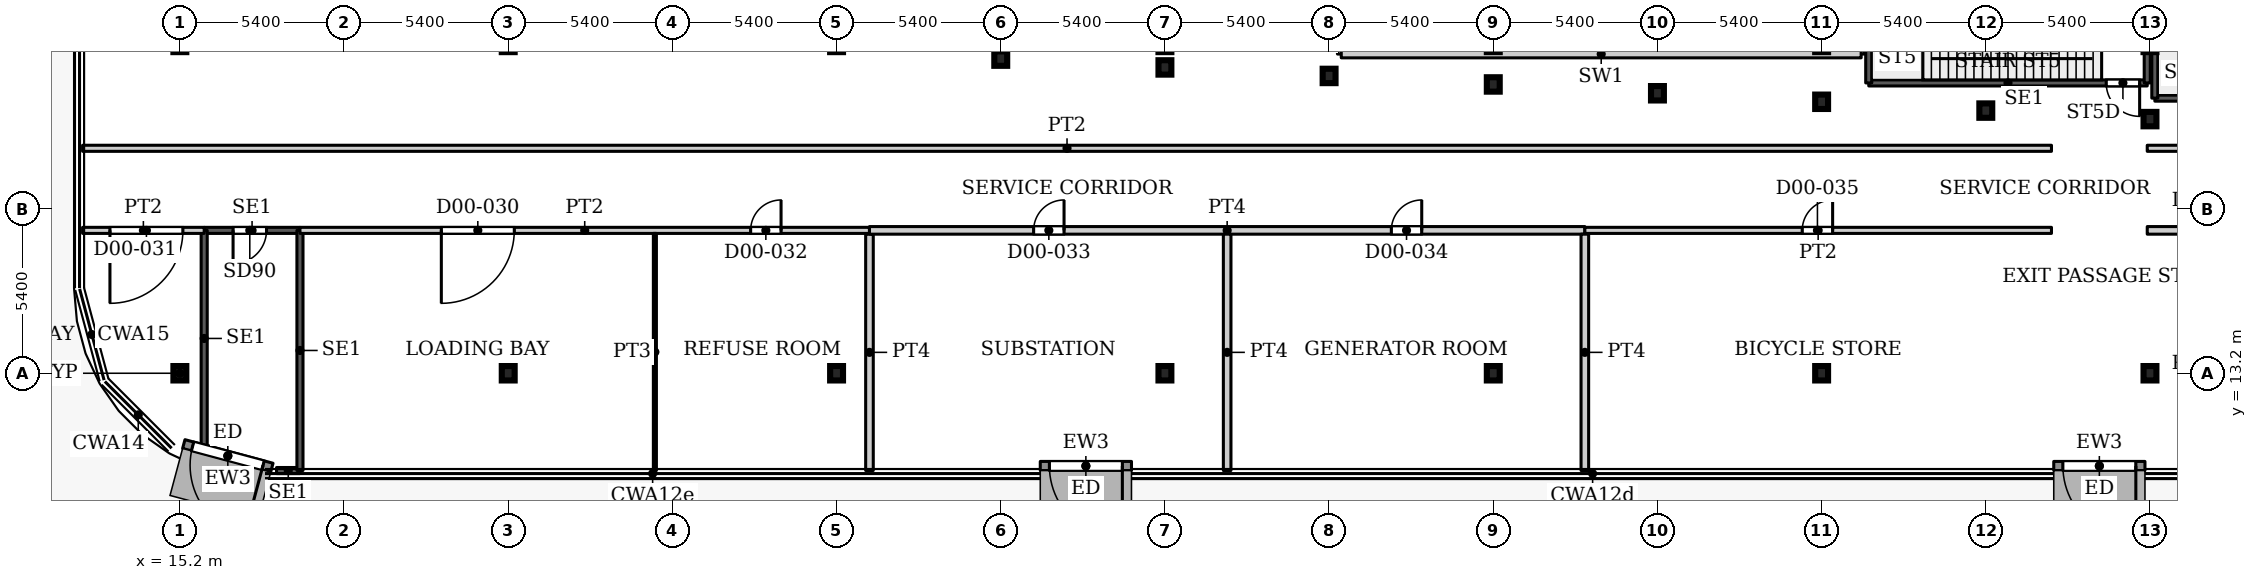
"""IFC4 building model, lengths in metres.
Left out: names, types, materials, properties, quantities, classifications, styles, units other than length and angle.
Written with IfcOpenShell. Run it as: python <this file> out.ifc"""

import sys

from ifc_helpers import new_model, si_unit, direction, frame, frame_2d, origin, origin_2d, place, context, subcontext, project, spatial, rectangle, i_section, extrude, source, transform, mapped, element, fill, save


model = new_model("IFC4")
c1 = context("Model", 3, precision=1e-05, world=origin(), true_north=direction((0.0, 1.0)))
c2 = subcontext(c1, "Body", "Model", "MODEL_VIEW")
j1 = project(units=[si_unit("LENGTHUNIT", "METRE"), si_unit("PLANEANGLEUNIT", "RADIAN")], contexts=[c1])
p1 = place(None, origin())
s1 = spatial("IfcSite", under=j1, at=p1, CompositionType="ELEMENT")
p2 = place(p1, origin())
s2 = spatial("IfcBuilding", under=s1, at=p2, CompositionType="ELEMENT")
p3 = place(p2, origin())
s3 = spatial("IfcBuildingStorey", under=s2, at=p3, CompositionType="ELEMENT", Elevation=0.0)
for number, where, z_axis, x_axis in (
    (1, (15.2, 13.2, 0.0), (0.0, 0.0, 1.0), (1.0, 0.0, 0.0)),
    (2, (26.0, 13.2, 0.0), (0.0, 0.0, 1.0), (1.0, 0.0, 0.0)),
    (3, (36.8, 13.2, 0.0), (0.0, 0.0, 1.0), (1.0, 0.0, 0.0)),
    (4, (47.6, 13.2, 0.0), (0.0, 0.0, 1.0), (1.0, 0.0, 0.0)),
    (5, (58.4, 13.2, 0.0), (0.0, 0.0, 1.0), (1.0, 0.0, 0.0)),
    (6, (69.2, 13.2, 0.0), (0.0, 0.0, 1.0), (1.0, 0.0, 0.0)),
    (7, (80.0, 13.2, 0.0), (0.0, 0.0, 1.0), (1.0, 0.0, 0.0)),
    (8, (80.0, 21.56, 0.0), (0.0, 0.0, 1.0), (1.0, 0.0, 0.0)),
    (9, (74.6, 21.84, 0.0), (0.0, 0.0, 1.0), (1.0, 0.0, 0.0)),
    (10, (69.2, 22.13, 0.0), (0.0, 0.0, 1.0), (1.0, 0.0, 0.0)),
    (11, (63.8, 22.41, 0.0), (0.0, 0.0, 1.0), (1.0, 0.0, 0.0)),
    (12, (58.4, 22.7, 0.0), (0.0, 0.0, 1.0), (1.0, 0.0, 0.0)),
    (13, (53.0, 22.98, 0.0), (0.0, 0.0, 1.0), (1.0, 0.0, 0.0)),
    (14, (47.6, 23.26, 0.0), (0.0, 0.0, 1.0), (1.0, 0.0, 0.0)),
    (15, (42.2, 23.55, 0.0), (0.0, 0.0, 1.0), (1.0, 0.0, 0.0)),
):
    element("IfcColumn", number, at=place(p3, frame(where, z_axis=z_axis, x_axis=x_axis)), inside=s3, PredefinedType="COLUMN", context=c2, shape_type="SweptSolid", body=[
        extrude(i_section(OverallWidth=0.424, OverallDepth=0.474, WebThickness=0.048, FlangeThickness=0.077, FilletRadius=0.014, at=origin_2d()), origin(), (0.0, 0.0, 1.0), 7.5),
    ])
p4 = place(p3, frame((79.835, 10.15, 0.0), z_axis=(0.0, 0.0, 1.0), x_axis=(-1.0, 0.0, 0.0)))
e16 = element("IfcWall", 16, at=p4, inside=s3, PredefinedType="SOLIDWALL", context=c2, shape_type="SweptSolid", body=[
    extrude(rectangle(XDim=3.0, YDim=0.3, at=frame_2d((1.5, 0.0))), origin(), (0.0, 0.0, 1.0), 7.25),
])
p5 = place(p4, frame((0.3, 0.0, 0.0)))
e17 = element("IfcOpeningElement", 17, at=p5, cuts=e16, PredefinedType="OPENING", context=c2, shape_type="SweptSolid", body=[
    extrude(rectangle(XDim=2.4, YDim=2.7, at=frame_2d((1.2, 1.35))), frame((0.0, 0.16, 0.0), z_axis=(0.0, -1.0, 0.0), x_axis=(1.0, 0.0, 0.0)), (0.0, 0.0, 1.0), 0.32),
])
p6 = place(p3, frame((46.5, 10.15, 0.0), z_axis=(0.0, 0.0, 1.0), x_axis=(-1.0, 0.0, 0.0)))
e18 = element("IfcWall", 18, at=p6, inside=s3, PredefinedType="SOLIDWALL", context=c2, shape_type="SweptSolid", body=[
    extrude(rectangle(XDim=3.0, YDim=0.3, at=frame_2d((1.5, 0.0))), origin(), (0.0, 0.0, 1.0), 7.25),
])
p7 = place(p6, frame((0.3, 0.0, 0.0)))
e19 = element("IfcOpeningElement", 19, at=p7, cuts=e18, PredefinedType="OPENING", context=c2, shape_type="SweptSolid", body=[
    extrude(rectangle(XDim=2.4, YDim=2.7, at=frame_2d((1.2, 1.35))), frame((0.0, 0.16, 0.0), z_axis=(0.0, -1.0, 0.0), x_axis=(1.0, 0.0, 0.0)), (0.0, 0.0, 1.0), 0.32),
])
p8 = place(p3, frame((18.226, 10.095, 0.0), z_axis=(0.0, 0.0, 1.0), x_axis=(-0.965935698168, 0.258782199939, 0.0)))
e20 = element("IfcWall", 20, at=p8, inside=s3, PredefinedType="SOLIDWALL", context=c2, shape_type="SweptSolid", body=[
    extrude(rectangle(XDim=2.999, YDim=0.3, at=frame_2d((1.5, 0.0))), origin(), (0.0, 0.0, 1.0), 7.25),
])
p9 = place(p8, frame((0.3, 0.0, 0.0)))
e21 = element("IfcOpeningElement", 21, at=p9, cuts=e20, PredefinedType="OPENING", context=c2, shape_type="SweptSolid", body=[
    extrude(rectangle(XDim=2.4, YDim=2.7, at=frame_2d((1.2, 1.35))), frame((0.0, 0.16, 0.0), z_axis=(0.0, -1.0, 0.0), x_axis=(1.0, 0.0, 0.0)), (0.0, 0.0, 1.0), 0.32),
])
p10 = place(p3, frame((80.16, 22.25, 0.0), z_axis=(0.0, 0.0, 1.0), x_axis=(1.0, 0.0, 0.0)))
e22 = element("IfcWall", 22, at=p10, inside=s3, PredefinedType="SHEAR", context=c2, shape_type="SweptSolid", body=[
    extrude(rectangle(XDim=9.16, YDim=0.2, at=frame_2d((4.58, 0.0))), origin(), (0.0, 0.0, 1.0), 7.5),
])
p11 = place(p10, frame((7.81, 0.0, 0.0)))
e23 = element("IfcOpeningElement", 23, at=p11, cuts=e22, PredefinedType="OPENING", context=c2, shape_type="SweptSolid", body=[
    extrude(rectangle(XDim=1.1, YDim=2.2, at=frame_2d((0.55, 1.1))), frame((0.0, 0.11, 0.0), z_axis=(0.0, -1.0, 0.0), x_axis=(1.0, 0.0, 0.0)), (0.0, 0.0, 1.0), 0.22),
])
p12 = place(p3, frame((80.16, 22.25, 0.0), z_axis=(0.0, 0.0, 1.0), x_axis=(0.0, 1.0, 0.0)))
e24 = element("IfcWall", 24, at=p12, inside=s3, PredefinedType="SHEAR", context=c2, shape_type="SweptSolid", body=[
    extrude(rectangle(XDim=3.15, YDim=0.2, at=frame_2d((1.575, 0.0))), origin(), (0.0, 0.0, 1.0), 7.5),
])
p13 = place(p3, frame((70.75, 22.75, 0.0), z_axis=(0.0, 0.0, 1.0), x_axis=(1.0, 0.0, 0.0)))
e25 = element("IfcWall", 25, at=p13, inside=s3, PredefinedType="SHEAR", context=c2, shape_type="SweptSolid", body=[
    extrude(rectangle(XDim=9.16, YDim=0.2, at=frame_2d((4.58, 0.0))), origin(), (0.0, 0.0, 1.0), 7.5),
])
p14 = place(p13, frame((7.81, 0.0, 0.0)))
e26 = element("IfcOpeningElement", 26, at=p14, cuts=e25, PredefinedType="OPENING", context=c2, shape_type="SweptSolid", body=[
    extrude(rectangle(XDim=1.1, YDim=2.2, at=frame_2d((0.55, 1.1))), frame((0.0, 0.11, 0.0), z_axis=(0.0, -1.0, 0.0), x_axis=(1.0, 0.0, 0.0)), (0.0, 0.0, 1.0), 0.22),
])
for number, where, z_axis, x_axis in (
    (27, (70.75, 22.75, 0.0), (0.0, 0.0, 1.0), (0.0, 1.0, 0.0)),
    (28, (79.91, 22.75, 0.0), (0.0, 0.0, 1.0), (0.0, 1.0, 0.0)),
):
    element("IfcWall", number, at=place(p3, frame(where, z_axis=z_axis, x_axis=x_axis)), inside=s3, PredefinedType="SHEAR", context=c2, shape_type="SweptSolid", body=[
        extrude(rectangle(XDim=3.15, YDim=0.2, at=frame_2d((1.575, 0.0))), origin(), (0.0, 0.0, 1.0), 7.5),
    ])
for number, where, z_axis, x_axis in (
    (29, (53.4, 23.7, 0.0), (0.0, 0.0, 1.0), (0.0, 1.0, 0.0)),
    (30, (61.95, 23.7, 0.0), (0.0, 0.0, 1.0), (0.0, 1.0, 0.0)),
    (31, (70.5, 23.7, 0.0), (0.0, 0.0, 1.0), (0.0, 1.0, 0.0)),
):
    element("IfcWall", number, at=place(p3, frame(where, z_axis=z_axis, x_axis=x_axis)), inside=s3, PredefinedType="PARTITIONING", context=c2, shape_type="SweptSolid", body=[
        extrude(rectangle(XDim=2.85, YDim=0.25, at=frame_2d((1.425, 0.0))), origin(), (0.0, 0.0, 1.0), 7.5),
    ])
p15 = place(p3, frame((53.4, 23.7, 0.0), z_axis=(0.0, 0.0, 1.0), x_axis=(1.0, 0.0, 0.0)))
e32 = element("IfcWall", 32, at=p15, inside=s3, PredefinedType="PARTITIONING", context=c2, shape_type="SweptSolid", body=[
    extrude(rectangle(XDim=17.1, YDim=0.25, at=frame_2d((8.55, 0.0))), origin(), (0.0, 0.0, 1.0), 7.5),
])
p16 = place(p3, frame((18.38, 10.0, 0.0), z_axis=(0.0, 0.0, 1.0), x_axis=(1.0, 0.0, 0.0)))
e33 = element("IfcWall", 33, at=p16, inside=s3, PredefinedType="SHEAR", context=c2, shape_type="SweptSolid", body=[
    extrude(rectangle(XDim=0.77, YDim=0.2, at=frame_2d((0.385, 0.0))), origin(), (0.0, 0.0, 1.0), 7.5),
])
p17 = place(p3, frame((16.0, 17.9, 0.0), z_axis=(0.0, 0.0, 1.0), x_axis=(1.0, 0.0, 0.0)))
e34 = element("IfcWall", 34, at=p17, inside=s3, PredefinedType="SHEAR", context=c2, shape_type="SweptSolid", body=[
    extrude(rectangle(XDim=3.15, YDim=0.2, at=frame_2d((1.575, 0.0))), origin(), (0.0, 0.0, 1.0), 7.5),
])
p18 = place(p17, frame((0.95, 0.0, 0.0)))
e35 = element("IfcOpeningElement", 35, at=p18, cuts=e34, PredefinedType="OPENING", context=c2, shape_type="SweptSolid", body=[
    extrude(rectangle(XDim=1.1, YDim=2.2, at=frame_2d((0.55, 1.1))), frame((0.0, 0.11, 0.0), z_axis=(0.0, -1.0, 0.0), x_axis=(1.0, 0.0, 0.0)), (0.0, 0.0, 1.0), 0.22),
])
p19 = place(p3, frame((16.0, 10.79, 0.0), z_axis=(0.0, 0.0, 1.0), x_axis=(0.0, 1.0, 0.0)))
e36 = element("IfcWall", 36, at=p19, inside=s3, PredefinedType="SHEAR", context=c2, shape_type="SweptSolid", body=[
    extrude(rectangle(XDim=7.11, YDim=0.2, at=frame_2d((3.555, 0.0))), origin(), (0.0, 0.0, 1.0), 7.5),
])
p20 = place(p3, frame((19.15, 10.0, 0.0), z_axis=(0.0, 0.0, 1.0), x_axis=(0.0, 1.0, 0.0)))
e37 = element("IfcWall", 37, at=p20, inside=s3, PredefinedType="SHEAR", context=c2, shape_type="SweptSolid", body=[
    extrude(rectangle(XDim=7.9, YDim=0.2, at=frame_2d((3.95, 0.0))), origin(), (0.0, 0.0, 1.0), 7.5),
])
p21 = place(p3, frame((12.0, 17.9, 0.0), z_axis=(0.0, 0.0, 1.0), x_axis=(1.0, 0.0, 0.0)))
e38 = element("IfcWall", 38, at=p21, inside=s3, PredefinedType="PARTITIONING", context=c2, shape_type="SweptSolid", body=[
    extrude(rectangle(XDim=4.0, YDim=0.2, at=frame_2d((2.0, 0.0))), origin(), (0.0, 0.0, 1.0), 7.08),
])
p22 = place(p21, frame((0.9, 0.0, 0.0)))
e39 = element("IfcOpeningElement", 39, at=p22, cuts=e38, PredefinedType="OPENING", context=c2, shape_type="SweptSolid", body=[
    extrude(rectangle(XDim=2.4, YDim=2.1, at=frame_2d((1.2, 1.05))), frame((0.0, 0.11, 0.0), z_axis=(0.0, -1.0, 0.0), x_axis=(1.0, 0.0, 0.0)), (0.0, 0.0, 1.0), 0.22),
])
p23 = place(p3, frame((12.0, 20.6, 0.0), z_axis=(0.0, 0.0, 1.0), x_axis=(1.0, 0.0, 0.0)))
e40 = element("IfcWall", 40, at=p23, inside=s3, PredefinedType="PARTITIONING", context=c2, shape_type="SweptSolid", body=[
    extrude(rectangle(XDim=64.76, YDim=0.2, at=frame_2d((32.38, 0.0))), origin(), (0.0, 0.0, 1.0), 7.08),
])
p24 = place(p3, frame((19.15, 17.9, 0.0), z_axis=(0.0, 0.0, 1.0), x_axis=(1.0, 0.0, 0.0)))
e41 = element("IfcWall", 41, at=p24, inside=s3, PredefinedType="PARTITIONING", context=c2, shape_type="SweptSolid", body=[
    extrude(rectangle(XDim=18.732, YDim=0.2, at=frame_2d((9.366, 0.0))), origin(), (0.0, 0.0, 1.0), 7.08),
])
p25 = place(p24, frame((4.65, 0.0, 0.0)))
e42 = element("IfcOpeningElement", 42, at=p25, cuts=e41, PredefinedType="OPENING", context=c2, shape_type="SweptSolid", body=[
    extrude(rectangle(XDim=2.4, YDim=2.1, at=frame_2d((1.2, 1.05))), frame((0.0, 0.11, 0.0), z_axis=(0.0, -1.0, 0.0), x_axis=(1.0, 0.0, 0.0)), (0.0, 0.0, 1.0), 0.22),
])
p26 = place(p24, frame((14.824, 0.0, 0.0)))
e43 = element("IfcOpeningElement", 43, at=p26, cuts=e41, PredefinedType="OPENING", context=c2, shape_type="SweptSolid", body=[
    extrude(rectangle(XDim=1.0, YDim=2.1, at=frame_2d((0.5, 1.05))), frame((0.0, 0.11, 0.0), z_axis=(0.0, -1.0, 0.0), x_axis=(1.0, 0.0, 0.0)), (0.0, 0.0, 1.0), 0.22),
])
p27 = place(p3, frame((30.824, 10.0, 0.0), z_axis=(0.0, 0.0, 1.0), x_axis=(0.0, 1.0, 0.0)))
e44 = element("IfcWall", 44, at=p27, inside=s3, PredefinedType="PARTITIONING", context=c2, shape_type="SweptSolid", body=[
    extrude(rectangle(XDim=7.8, YDim=0.1, at=frame_2d((3.9, 0.0))), origin(), (0.0, 0.0, 1.0), 7.08),
])
p28 = place(p3, frame((37.882, 10.0, 0.0), z_axis=(0.0, 0.0, 1.0), x_axis=(0.0, 1.0, 0.0)))
e45 = element("IfcWall", 45, at=p28, inside=s3, PredefinedType="PARTITIONING", context=c2, shape_type="SweptSolid", body=[
    extrude(rectangle(XDim=7.775, YDim=0.25, at=frame_2d((3.887, 0.0))), origin(), (0.0, 0.0, 1.0), 7.08),
])
p29 = place(p3, frame((37.882, 17.9, 0.0), z_axis=(0.0, 0.0, 1.0), x_axis=(1.0, 0.0, 0.0)))
e46 = element("IfcWall", 46, at=p29, inside=s3, PredefinedType="PARTITIONING", context=c2, shape_type="SweptSolid", body=[
    extrude(rectangle(XDim=23.53, YDim=0.25, at=frame_2d((11.765, 0.0))), origin(), (0.0, 0.0, 1.0), 7.08),
])
p30 = place(p29, frame((5.4, 0.0, 0.0)))
e47 = element("IfcOpeningElement", 47, at=p30, cuts=e46, PredefinedType="OPENING", context=c2, shape_type="SweptSolid", body=[
    extrude(rectangle(XDim=1.0, YDim=2.1, at=frame_2d((0.5, 1.05))), frame((0.0, 0.135, 0.0), z_axis=(0.0, -1.0, 0.0), x_axis=(1.0, 0.0, 0.0)), (0.0, 0.0, 1.0), 0.27),
])
p31 = place(p29, frame((17.165, 0.0, 0.0)))
e48 = element("IfcOpeningElement", 48, at=p31, cuts=e46, PredefinedType="OPENING", context=c2, shape_type="SweptSolid", body=[
    extrude(rectangle(XDim=1.0, YDim=2.1, at=frame_2d((0.5, 1.05))), frame((0.0, 0.135, 0.0), z_axis=(0.0, -1.0, 0.0), x_axis=(1.0, 0.0, 0.0)), (0.0, 0.0, 1.0), 0.27),
])
for number, where, z_axis, x_axis in (
    (49, (49.647, 10.0, 0.0), (0.0, 0.0, 1.0), (0.0, 1.0, 0.0)),
    (50, (61.412, 10.0, 0.0), (0.0, 0.0, 1.0), (0.0, 1.0, 0.0)),
):
    element("IfcWall", number, at=place(p3, frame(where, z_axis=z_axis, x_axis=x_axis)), inside=s3, PredefinedType="PARTITIONING", context=c2, shape_type="SweptSolid", body=[
        extrude(rectangle(XDim=7.775, YDim=0.25, at=frame_2d((3.887, 0.0))), origin(), (0.0, 0.0, 1.0), 7.08),
    ])
p32 = place(p3, frame((61.412, 17.9, 0.0), z_axis=(0.0, 0.0, 1.0), x_axis=(1.0, 0.0, 0.0)))
e51 = element("IfcWall", 51, at=p32, inside=s3, PredefinedType="PARTITIONING", context=c2, shape_type="SweptSolid", body=[
    extrude(rectangle(XDim=15.348, YDim=0.2, at=frame_2d((7.674, 0.0))), origin(), (0.0, 0.0, 1.0), 7.08),
])
p33 = place(p32, frame((7.15, 0.0, 0.0)))
e52 = element("IfcOpeningElement", 52, at=p33, cuts=e51, PredefinedType="OPENING", context=c2, shape_type="SweptSolid", body=[
    extrude(rectangle(XDim=1.0, YDim=2.1, at=frame_2d((0.5, 1.05))), frame((0.0, 0.11, 0.0), z_axis=(0.0, -1.0, 0.0), x_axis=(1.0, 0.0, 0.0)), (0.0, 0.0, 1.0), 0.22),
])
p34 = place(p3, frame((79.91, 17.9, 0.0), z_axis=(0.0, 0.0, 1.0), x_axis=(1.0, 0.0, 0.0)))
e53 = element("IfcWall", 53, at=p34, inside=s3, PredefinedType="PARTITIONING", context=c2, shape_type="SweptSolid", body=[
    extrude(rectangle(XDim=6.26, YDim=0.25, at=frame_2d((3.13, 0.0))), origin(), (0.0, 0.0, 1.0), 7.08),
])
p35 = place(p34, frame((2.65, 0.0, 0.0)))
e54 = element("IfcOpeningElement", 54, at=p35, cuts=e53, PredefinedType="OPENING", context=c2, shape_type="SweptSolid", body=[
    extrude(rectangle(XDim=1.0, YDim=2.1, at=frame_2d((0.5, 1.05))), frame((0.0, 0.135, 0.0), z_axis=(0.0, -1.0, 0.0), x_axis=(1.0, 0.0, 0.0)), (0.0, 0.0, 1.0), 0.27),
])
p36 = place(p3, frame((79.91, 20.6, 0.0), z_axis=(0.0, 0.0, 1.0), x_axis=(1.0, 0.0, 0.0)))
e55 = element("IfcWall", 55, at=p36, inside=s3, PredefinedType="PARTITIONING", context=c2, shape_type="SweptSolid", body=[
    extrude(rectangle(XDim=6.26, YDim=0.2, at=frame_2d((3.13, 0.0))), origin(), (0.0, 0.0, 1.0), 7.08),
])
m1 = source(origin(), c2, "Body", "SweptSolid", [
    extrude(rectangle(XDim=2.4, YDim=2.7, at=frame_2d((1.2, 1.35))), frame((0.0, 0.025, 0.0), z_axis=(0.0, -1.0, 0.0), x_axis=(1.0, 0.0, 0.0)), (0.0, 0.0, 1.0), 0.05),
])
p37 = place(p5, origin())
e56 = element("IfcDoor", 56, at=p37, inside=s3, OperationType="DOUBLE_DOOR_SINGLE_SWING", PredefinedType="DOOR", context=c2, shape_type="MappedRepresentation", body=[
    mapped(m1, transform((0.0, 0.0, 0.0), x_axis=(1.0, 0.0, 0.0), y_axis=(0.0, 1.0, 0.0), z_axis=(0.0, 0.0, 1.0), scale=1.0)),
])
fill(e17, e56)
p38 = place(p7, origin())
e57 = element("IfcDoor", 57, at=p38, inside=s3, OperationType="DOUBLE_DOOR_SINGLE_SWING", PredefinedType="DOOR", context=c2, shape_type="MappedRepresentation", body=[
    mapped(m1, transform((0.0, 0.0, 0.0), x_axis=(1.0, 0.0, 0.0), y_axis=(0.0, 1.0, 0.0), z_axis=(0.0, 0.0, 1.0), scale=1.0)),
])
fill(e19, e57)
p39 = place(p9, origin())
e58 = element("IfcDoor", 58, at=p39, inside=s3, OperationType="DOUBLE_DOOR_SINGLE_SWING", PredefinedType="DOOR", context=c2, shape_type="MappedRepresentation", body=[
    mapped(m1, transform((0.0, 0.0, 0.0), x_axis=(1.0, 0.0, 0.0), y_axis=(0.0, 1.0, 0.0), z_axis=(0.0, 0.0, 1.0), scale=1.0)),
])
fill(e21, e58)
m2 = source(origin(), c2, "Body", "SweptSolid", [
    extrude(rectangle(XDim=1.1, YDim=2.2, at=frame_2d((0.55, 1.1))), frame((0.0, 0.025, 0.0), z_axis=(0.0, -1.0, 0.0), x_axis=(1.0, 0.0, 0.0)), (0.0, 0.0, 1.0), 0.05),
])
p40 = place(p18, origin())
e59 = element("IfcDoor", 59, at=p40, inside=s3, OperationType="SINGLE_SWING_RIGHT", PredefinedType="DOOR", context=c2, shape_type="MappedRepresentation", body=[
    mapped(m2, transform((0.0, 0.0, 0.0), x_axis=(1.0, 0.0, 0.0), y_axis=(0.0, 1.0, 0.0), z_axis=(0.0, 0.0, 1.0), scale=1.0)),
])
fill(e35, e59)
p41 = place(p14, origin())
e60 = element("IfcDoor", 60, at=p41, inside=s3, OperationType="SINGLE_SWING_RIGHT", PredefinedType="DOOR", context=c2, shape_type="MappedRepresentation", body=[
    mapped(m2, transform((0.0, 0.0, 0.0), x_axis=(1.0, 0.0, 0.0), y_axis=(0.0, 1.0, 0.0), z_axis=(0.0, 0.0, 1.0), scale=1.0)),
])
fill(e26, e60)
m3 = source(origin(), c2, "Body", "SweptSolid", [
    extrude(rectangle(XDim=2.4, YDim=2.1, at=frame_2d((1.2, 1.05))), frame((0.0, 0.025, 0.0), z_axis=(0.0, -1.0, 0.0), x_axis=(1.0, 0.0, 0.0)), (0.0, 0.0, 1.0), 0.05),
])
p42 = place(p25, origin())
e61 = element("IfcDoor", 61, at=p42, inside=s3, OperationType="DOUBLE_DOOR_SINGLE_SWING", PredefinedType="DOOR", context=c2, shape_type="MappedRepresentation", body=[
    mapped(m3, transform((0.0, 0.0, 0.0), x_axis=(1.0, 0.0, 0.0), y_axis=(0.0, 1.0, 0.0), z_axis=(0.0, 0.0, 1.0), scale=1.0)),
])
fill(e42, e61)
p43 = place(p22, origin())
e62 = element("IfcDoor", 62, at=p43, inside=s3, OperationType="DOUBLE_DOOR_SINGLE_SWING", PredefinedType="DOOR", context=c2, shape_type="MappedRepresentation", body=[
    mapped(m3, transform((0.0, 0.0, 0.0), x_axis=(1.0, 0.0, 0.0), y_axis=(0.0, 1.0, 0.0), z_axis=(0.0, 0.0, 1.0), scale=1.0)),
])
fill(e39, e62)
m4 = source(origin(), c2, "Body", "SweptSolid", [
    extrude(rectangle(XDim=1.0, YDim=2.1, at=frame_2d((0.5, 1.05))), frame((0.0, 0.025, 0.0), z_axis=(0.0, -1.0, 0.0), x_axis=(1.0, 0.0, 0.0)), (0.0, 0.0, 1.0), 0.05),
])
p44 = place(p26, origin())
e63 = element("IfcDoor", 63, at=p44, inside=s3, OperationType="SINGLE_SWING_LEFT", PredefinedType="DOOR", context=c2, shape_type="MappedRepresentation", body=[
    mapped(m4, transform((0.0, 0.0, 0.0), x_axis=(1.0, 0.0, 0.0), y_axis=(0.0, 1.0, 0.0), z_axis=(0.0, 0.0, 1.0), scale=1.0)),
])
fill(e43, e63)
m5 = source(origin(), c2, "Body", "SweptSolid", [
    extrude(rectangle(XDim=1.0, YDim=2.1, at=frame_2d((0.5, 1.05))), frame((0.0, 0.025, 0.0), z_axis=(0.0, -1.0, 0.0), x_axis=(1.0, 0.0, 0.0)), (0.0, 0.0, 1.0), 0.05),
])
p45 = place(p30, origin())
e64 = element("IfcDoor", 64, at=p45, inside=s3, OperationType="SINGLE_SWING_LEFT", PredefinedType="DOOR", context=c2, shape_type="MappedRepresentation", body=[
    mapped(m5, transform((0.0, 0.0, 0.0), x_axis=(1.0, 0.0, 0.0), y_axis=(0.0, 1.0, 0.0), z_axis=(0.0, 0.0, 1.0), scale=1.0)),
])
fill(e47, e64)
p46 = place(p31, origin())
e65 = element("IfcDoor", 65, at=p46, inside=s3, OperationType="SINGLE_SWING_LEFT", PredefinedType="DOOR", context=c2, shape_type="MappedRepresentation", body=[
    mapped(m5, transform((0.0, 0.0, 0.0), x_axis=(1.0, 0.0, 0.0), y_axis=(0.0, 1.0, 0.0), z_axis=(0.0, 0.0, 1.0), scale=1.0)),
])
fill(e48, e65)
p47 = place(p33, origin())
e66 = element("IfcDoor", 66, at=p47, inside=s3, OperationType="SINGLE_SWING_LEFT", PredefinedType="DOOR", context=c2, shape_type="MappedRepresentation", body=[
    mapped(m4, transform((0.0, 0.0, 0.0), x_axis=(1.0, 0.0, 0.0), y_axis=(0.0, 1.0, 0.0), z_axis=(0.0, 0.0, 1.0), scale=1.0)),
])
fill(e52, e66)
save(model, sys.argv[1])
